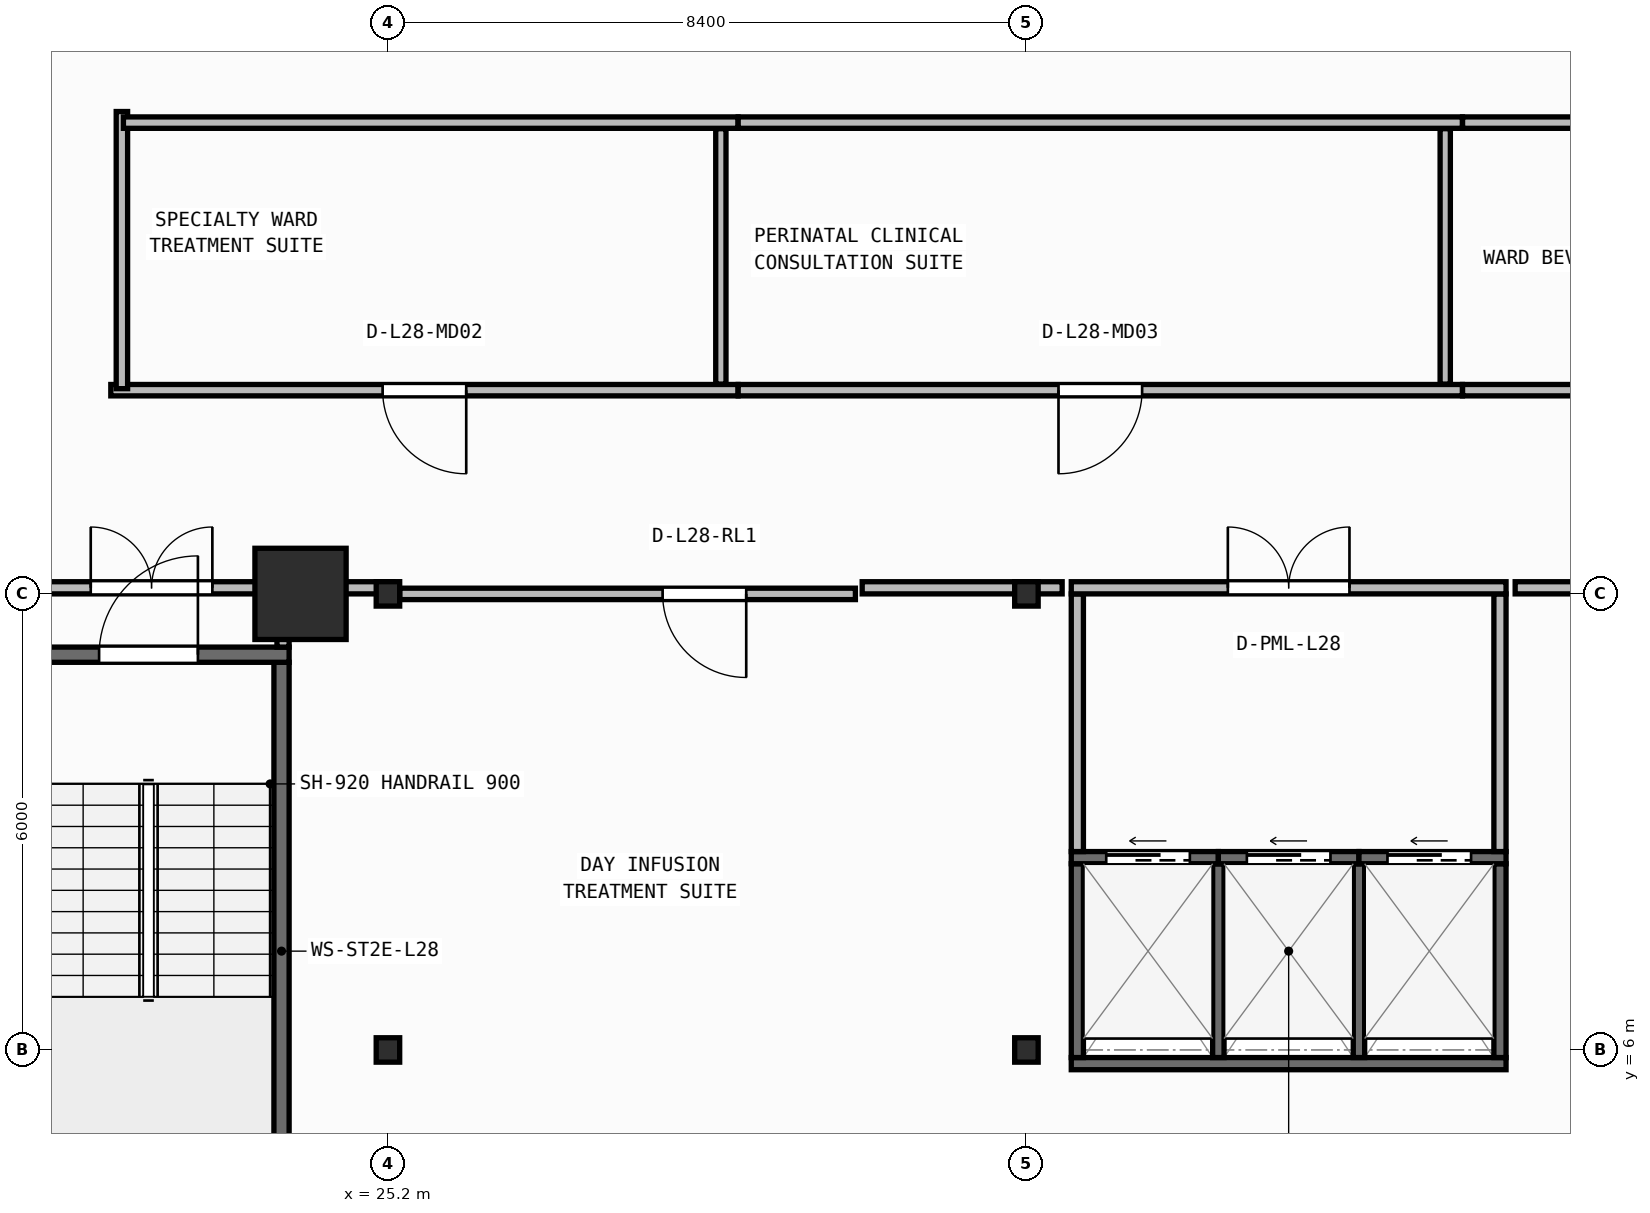
"""IFC4 building model, lengths in metres.
Left out: names, types, materials, properties, quantities, classifications, styles, units other than length and angle.
Written with IfcOpenShell. Run it as: python <this file> out.ifc"""

import sys

from ifc_helpers import new_model, si_unit, direction, frame, frame_2d, origin, origin_2d, place, context, subcontext, project, spatial, rectangle, i_section, extrude, element, fill, save


model = new_model("IFC4")
c1 = context("Model", 3, precision=1e-05, world=origin(), true_north=direction((0.0, 1.0)))
c2 = subcontext(c1, "Body", "Model", "MODEL_VIEW")
j1 = project(units=[si_unit("LENGTHUNIT", "METRE"), si_unit("PLANEANGLEUNIT", "RADIAN")], contexts=[c1])
p1 = place(None, origin())
s1 = spatial("IfcSite", under=j1, at=p1, CompositionType="ELEMENT")
p2 = place(p1, origin())
s2 = spatial("IfcBuilding", under=s1, at=p2, CompositionType="ELEMENT")
p3 = place(p2, frame((0.0, 0.0, 115.2)))
s3 = spatial("IfcBuildingStorey", under=s2, at=p3, CompositionType="ELEMENT", Elevation=115.2)
for number, where, z_axis, x_axis in (
    (1, (25.2, 6.0, 0.0), (0.0, 0.0, 1.0), (1.0, 0.0, 0.0)),
    (2, (33.6, 6.0, 0.0), (0.0, 0.0, 1.0), (1.0, 0.0, 0.0)),
):
    element("IfcColumn", number, at=place(p3, frame(where, z_axis=z_axis, x_axis=x_axis)), inside=s3, PredefinedType="COLUMN", context=c2, shape_type="SweptSolid", body=[
        extrude(i_section(OverallWidth=0.309, OverallDepth=0.321, WebThickness=0.014, FlangeThickness=0.022, FilletRadius=0.017, at=origin_2d()), origin(), (0.0, 0.0, 1.0), 3.95),
    ])
p4 = place(p3, frame((24.05, 12.0, 0.0), z_axis=(0.0, 0.0, 1.0), x_axis=(1.0, 0.0, 0.0)))
e3 = element("IfcColumn", 3, at=p4, inside=s3, PredefinedType="COLUMN", context=c2, shape_type="SweptSolid", body=[
    extrude(rectangle(XDim=1.2, YDim=1.2, at=origin_2d()), origin(), (0.0, 0.0, 1.0), 3.95),
])
for number, where, z_axis, x_axis in (
    (4, (25.2, 12.0, 0.0), (0.0, 0.0, 1.0), (1.0, 0.0, 0.0)),
    (5, (33.6, 12.0, 0.0), (0.0, 0.0, 1.0), (1.0, 0.0, 0.0)),
):
    element("IfcColumn", number, at=place(p3, frame(where, z_axis=z_axis, x_axis=x_axis)), inside=s3, PredefinedType="COLUMN", context=c2, shape_type="SweptSolid", body=[
        extrude(i_section(OverallWidth=0.309, OverallDepth=0.321, WebThickness=0.014, FlangeThickness=0.022, FilletRadius=0.017, at=origin_2d()), origin(), (0.0, 0.0, 1.0), 3.95),
    ])
p5 = place(p3, frame((23.8, 3.5, 0.0), z_axis=(0.0, 0.0, 1.0), x_axis=(0.0, 1.0, 0.0)))
e6 = element("IfcWall", 6, at=p5, inside=s3, PredefinedType="SHEAR", context=c2, shape_type="SweptSolid", body=[
    extrude(rectangle(XDim=7.6, YDim=0.2, at=frame_2d((3.8, 0.0))), origin(), (0.0, 0.0, 1.0), 3.71),
])
p6 = place(p3, frame((20.2, 11.2, 0.0), z_axis=(0.0, 0.0, 1.0), x_axis=(1.0, 0.0, 0.0)))
e7 = element("IfcWall", 7, at=p6, inside=s3, PredefinedType="SHEAR", context=c2, shape_type="SweptSolid", body=[
    extrude(rectangle(XDim=3.7, YDim=0.2, at=frame_2d((1.85, 0.0))), origin(), (0.0, 0.0, 1.0), 3.71),
])
p7 = place(p6, frame((1.2, 0.0, 0.0)))
e8 = element("IfcOpeningElement", 8, at=p7, cuts=e7, PredefinedType="OPENING", context=c2, shape_type="SweptSolid", body=[
    extrude(rectangle(XDim=1.3, YDim=2.15, at=frame_2d((0.65, 1.075))), frame((0.0, 0.11, 0.0), z_axis=(0.0, -1.0, 0.0), x_axis=(1.0, 0.0, 0.0)), (0.0, 0.0, 1.0), 0.22),
])
p8 = place(p3, frame((34.19, 5.82, 0.0), z_axis=(0.0, 0.0, 1.0), x_axis=(1.0, 0.0, 0.0)))
e9 = element("IfcWall", 9, at=p8, inside=s3, PredefinedType="SHEAR", context=c2, shape_type="SweptSolid", body=[
    extrude(rectangle(XDim=5.72, YDim=0.16, at=frame_2d((2.86, 0.0))), origin(), (0.0, 0.0, 1.0), 3.71),
])
for number, where, z_axis, x_axis in (
    (10, (34.27, 5.9, 0.0), (0.0, 0.0, 1.0), (0.0, 1.0, 0.0)),
    (11, (39.83, 5.9, 0.0), (0.0, 0.0, 1.0), (0.0, 1.0, 0.0)),
):
    element("IfcWall", number, at=place(p3, frame(where, z_axis=z_axis, x_axis=x_axis)), inside=s3, PredefinedType="SHEAR", context=c2, shape_type="SweptSolid", body=[
        extrude(rectangle(XDim=2.55, YDim=0.16, at=frame_2d((1.275, 0.0))), origin(), (0.0, 0.0, 1.0), 3.71),
    ])
for number, where, z_axis, x_axis in (
    (12, (36.125, 5.9, 0.0), (0.0, 0.0, 1.0), (0.0, 1.0, 0.0)),
    (13, (37.975, 5.9, 0.0), (0.0, 0.0, 1.0), (0.0, 1.0, 0.0)),
):
    element("IfcWall", number, at=place(p3, frame(where, z_axis=z_axis, x_axis=x_axis)), inside=s3, PredefinedType="SHEAR", context=c2, shape_type="SweptSolid", body=[
        extrude(rectangle(XDim=2.55, YDim=0.15, at=frame_2d((1.275, 0.0))), origin(), (0.0, 0.0, 1.0), 3.71),
    ])
p9 = place(p3, frame((34.19, 8.53, 0.0), z_axis=(0.0, 0.0, 1.0), x_axis=(1.0, 0.0, 0.0)))
e14 = element("IfcWall", 14, at=p9, inside=s3, PredefinedType="SHEAR", context=c2, shape_type="SweptSolid", body=[
    extrude(rectangle(XDim=1.935, YDim=0.16, at=frame_2d((0.968, 0.0))), origin(), (0.0, 0.0, 1.0), 3.71),
])
p10 = place(p9, frame((0.46, 0.0, 0.0)))
e15 = element("IfcOpeningElement", 15, at=p10, cuts=e14, PredefinedType="OPENING", context=c2, shape_type="SweptSolid", body=[
    extrude(rectangle(XDim=1.1, YDim=2.15, at=frame_2d((0.55, 1.075))), frame((0.0, 0.09, 0.0), z_axis=(0.0, -1.0, 0.0), x_axis=(1.0, 0.0, 0.0)), (0.0, 0.0, 1.0), 0.18),
])
p11 = place(p3, frame((36.125, 8.53, 0.0), z_axis=(0.0, 0.0, 1.0), x_axis=(1.0, 0.0, 0.0)))
e16 = element("IfcWall", 16, at=p11, inside=s3, PredefinedType="SHEAR", context=c2, shape_type="SweptSolid", body=[
    extrude(rectangle(XDim=1.85, YDim=0.16, at=frame_2d((0.925, 0.0))), origin(), (0.0, 0.0, 1.0), 3.71),
])
p12 = place(p11, frame((0.375, 0.0, 0.0)))
e17 = element("IfcOpeningElement", 17, at=p12, cuts=e16, PredefinedType="OPENING", context=c2, shape_type="SweptSolid", body=[
    extrude(rectangle(XDim=1.1, YDim=2.15, at=frame_2d((0.55, 1.075))), frame((0.0, 0.09, 0.0), z_axis=(0.0, -1.0, 0.0), x_axis=(1.0, 0.0, 0.0)), (0.0, 0.0, 1.0), 0.18),
])
p13 = place(p3, frame((37.975, 8.53, 0.0), z_axis=(0.0, 0.0, 1.0), x_axis=(1.0, 0.0, 0.0)))
e18 = element("IfcWall", 18, at=p13, inside=s3, PredefinedType="SHEAR", context=c2, shape_type="SweptSolid", body=[
    extrude(rectangle(XDim=1.935, YDim=0.16, at=frame_2d((0.967, 0.0))), origin(), (0.0, 0.0, 1.0), 3.71),
])
p14 = place(p13, frame((0.375, 0.0, 0.0)))
e19 = element("IfcOpeningElement", 19, at=p14, cuts=e18, PredefinedType="OPENING", context=c2, shape_type="SweptSolid", body=[
    extrude(rectangle(XDim=1.1, YDim=2.15, at=frame_2d((0.55, 1.075))), frame((0.0, 0.09, 0.0), z_axis=(0.0, -1.0, 0.0), x_axis=(1.0, 0.0, 0.0)), (0.0, 0.0, 1.0), 0.18),
])
p15 = place(p3, frame((20.28, 12.08, 0.0), z_axis=(0.0, 0.0, 1.0), x_axis=(1.0, 0.0, 0.0)))
e20 = element("IfcWall", 20, at=p15, inside=s3, PredefinedType="PARTITIONING", context=c2, shape_type="SweptSolid", body=[
    extrude(rectangle(XDim=3.62, YDim=0.16, at=frame_2d((1.81, 0.0))), origin(), (0.0, 0.0, 1.0), 3.083),
])
p16 = place(p15, frame((1.01, 0.0, 0.0)))
e21 = element("IfcOpeningElement", 21, at=p16, cuts=e20, PredefinedType="OPENING", context=c2, shape_type="SweptSolid", body=[
    extrude(rectangle(XDim=1.6, YDim=2.05, at=frame_2d((0.8, 1.025))), frame((0.0, 0.09, 0.0), z_axis=(0.0, -1.0, 0.0), x_axis=(1.0, 0.0, 0.0)), (0.0, 0.0, 1.0), 0.18),
])
p17 = place(p3, frame((23.82, 11.3, 0.0), z_axis=(0.0, 0.0, 1.0), x_axis=(0.0, 1.0, 0.0)))
e22 = element("IfcWall", 22, at=p17, inside=s3, PredefinedType="PARTITIONING", context=c2, shape_type="SweptSolid", body=[
    extrude(rectangle(XDim=0.7, YDim=0.16, at=frame_2d((0.35, 0.0))), origin(), (0.0, 0.0, 1.0), 3.71),
])
for number, where, z_axis, x_axis in (
    (23, (34.27, 8.61, 0.0), (0.0, 0.0, 1.0), (0.0, 1.0, 0.0)),
    (24, (39.83, 8.61, 0.0), (0.0, 0.0, 1.0), (0.0, 1.0, 0.0)),
):
    element("IfcWall", number, at=place(p3, frame(where, z_axis=z_axis, x_axis=x_axis)), inside=s3, PredefinedType="PARTITIONING", context=c2, shape_type="SweptSolid", body=[
        extrude(rectangle(XDim=3.39, YDim=0.16, at=frame_2d((1.695, 0.0))), origin(), (0.0, 0.0, 1.0), 3.71),
    ])
p18 = place(p3, frame((34.19, 12.08, 0.0), z_axis=(0.0, 0.0, 1.0), x_axis=(1.0, 0.0, 0.0)))
e25 = element("IfcWall", 25, at=p18, inside=s3, PredefinedType="PARTITIONING", context=c2, shape_type="SweptSolid", body=[
    extrude(rectangle(XDim=5.72, YDim=0.16, at=frame_2d((2.86, 0.0))), origin(), (0.0, 0.0, 1.0), 3.083),
])
p19 = place(p18, frame((2.06, 0.0, 0.0)))
e26 = element("IfcOpeningElement", 26, at=p19, cuts=e25, PredefinedType="OPENING", context=c2, shape_type="SweptSolid", body=[
    extrude(rectangle(XDim=1.6, YDim=2.05, at=frame_2d((0.8, 1.025))), frame((0.0, 0.09, 0.0), z_axis=(0.0, -1.0, 0.0), x_axis=(1.0, 0.0, 0.0)), (0.0, 0.0, 1.0), 0.18),
])
p20 = place(p3, frame((31.35, 12.0, 0.0), z_axis=(0.0, 0.0, 1.0), x_axis=(-1.0, 0.0, 0.0)))
e27 = element("IfcWall", 27, at=p20, inside=s3, PredefinedType="PARTITIONING", context=c2, shape_type="SweptSolid", body=[
    extrude(rectangle(XDim=5.996, YDim=0.15, at=frame_2d((2.998, 0.0))), origin(), (0.0, 0.0, 1.0), 3.083),
])
p21 = place(p20, frame((1.436, 0.0, 0.0)))
e28 = element("IfcOpeningElement", 28, at=p21, cuts=e27, PredefinedType="OPENING", context=c2, shape_type="SweptSolid", body=[
    extrude(rectangle(XDim=1.1, YDim=2.1, at=frame_2d((0.55, 1.05))), frame((0.0, 0.085, 0.0), z_axis=(0.0, -1.0, 0.0), x_axis=(1.0, 0.0, 0.0)), (0.0, 0.0, 1.0), 0.17),
])
p22 = place(p3, frame((29.806, 14.68, 0.0), z_axis=(0.0, 0.0, 1.0), x_axis=(-1.0, 0.0, 0.0)))
e29 = element("IfcWall", 29, at=p22, inside=s3, PredefinedType="PARTITIONING", context=c2, shape_type="SweptSolid", body=[
    extrude(rectangle(XDim=8.252, YDim=0.15, at=frame_2d((4.126, 0.0))), origin(), (0.0, 0.0, 1.0), 3.71),
])
p23 = place(p22, frame((3.576, 0.0, 0.0)))
e30 = element("IfcOpeningElement", 30, at=p23, cuts=e29, PredefinedType="OPENING", context=c2, shape_type="SweptSolid", body=[
    extrude(rectangle(XDim=1.1, YDim=2.1, at=frame_2d((0.55, 1.05))), frame((0.0, 0.085, 0.0), z_axis=(0.0, -1.0, 0.0), x_axis=(1.0, 0.0, 0.0)), (0.0, 0.0, 1.0), 0.17),
])
p24 = place(p3, frame((39.336, 14.68, 0.0), z_axis=(0.0, 0.0, 1.0), x_axis=(-1.0, 0.0, 0.0)))
e31 = element("IfcWall", 31, at=p24, inside=s3, PredefinedType="PARTITIONING", context=c2, shape_type="SweptSolid", body=[
    extrude(rectangle(XDim=9.528, YDim=0.15, at=frame_2d((4.764, 0.0))), origin(), (0.0, 0.0, 1.0), 3.71),
])
p25 = place(p24, frame((4.214, 0.0, 0.0)))
e32 = element("IfcOpeningElement", 32, at=p25, cuts=e31, PredefinedType="OPENING", context=c2, shape_type="SweptSolid", body=[
    extrude(rectangle(XDim=1.1, YDim=2.1, at=frame_2d((0.55, 1.05))), frame((0.0, 0.085, 0.0), z_axis=(0.0, -1.0, 0.0), x_axis=(1.0, 0.0, 0.0)), (0.0, 0.0, 1.0), 0.17),
])
p26 = place(p3, frame((51.586, 14.68, 0.0), z_axis=(0.0, 0.0, 1.0), x_axis=(-1.0, 0.0, 0.0)))
e33 = element("IfcWall", 33, at=p26, inside=s3, PredefinedType="PARTITIONING", context=c2, shape_type="SweptSolid", body=[
    extrude(rectangle(XDim=12.248, YDim=0.15, at=frame_2d((6.124, 0.0))), origin(), (0.0, 0.0, 1.0), 3.71),
])
p27 = place(p26, frame((5.574, 0.0, 0.0)))
e34 = element("IfcOpeningElement", 34, at=p27, cuts=e33, PredefinedType="OPENING", context=c2, shape_type="SweptSolid", body=[
    extrude(rectangle(XDim=1.1, YDim=2.1, at=frame_2d((0.55, 1.05))), frame((0.0, 0.085, 0.0), z_axis=(0.0, -1.0, 0.0), x_axis=(1.0, 0.0, 0.0)), (0.0, 0.0, 1.0), 0.17),
])
p28 = place(p3, frame((21.7, 14.7, 0.0), z_axis=(0.0, 0.0, 1.0), x_axis=(0.0, 1.0, 0.0)))
e35 = element("IfcWall", 35, at=p28, inside=s3, PredefinedType="PARTITIONING", context=c2, shape_type="SweptSolid", body=[
    extrude(rectangle(XDim=3.646, YDim=0.15, at=frame_2d((1.823, 0.0))), origin(), (0.0, 0.0, 1.0), 3.71),
])
p29 = place(p3, frame((21.72, 18.2, 0.0), z_axis=(0.0, 0.0, 1.0), x_axis=(1.0, 0.0, 0.0)))
e36 = element("IfcWall", 36, at=p29, inside=s3, PredefinedType="PARTITIONING", context=c2, shape_type="SweptSolid", body=[
    extrude(rectangle(XDim=8.086, YDim=0.15, at=frame_2d((4.043, 0.0))), origin(), (0.0, 0.0, 1.0), 3.71),
])
p30 = place(p3, frame((29.808, 18.2, 0.0), z_axis=(0.0, 0.0, 1.0), x_axis=(1.0, 0.0, 0.0)))
e37 = element("IfcWall", 37, at=p30, inside=s3, PredefinedType="PARTITIONING", context=c2, shape_type="SweptSolid", body=[
    extrude(rectangle(XDim=9.528, YDim=0.15, at=frame_2d((4.764, 0.0))), origin(), (0.0, 0.0, 1.0), 3.71),
])
p31 = place(p3, frame((39.338, 18.2, 0.0), z_axis=(0.0, 0.0, 1.0), x_axis=(1.0, 0.0, 0.0)))
e38 = element("IfcWall", 38, at=p31, inside=s3, PredefinedType="PARTITIONING", context=c2, shape_type="SweptSolid", body=[
    extrude(rectangle(XDim=12.248, YDim=0.15, at=frame_2d((6.124, 0.0))), origin(), (0.0, 0.0, 1.0), 3.71),
])
for number, where, z_axis, x_axis in (
    (39, (29.58, 14.76, 0.0), (0.0, 0.0, 1.0), (0.0, 1.0, 0.0)),
    (40, (39.11, 14.76, 0.0), (0.0, 0.0, 1.0), (0.0, 1.0, 0.0)),
):
    element("IfcWall", number, at=place(p3, frame(where, z_axis=z_axis, x_axis=x_axis)), inside=s3, PredefinedType="PARTITIONING", context=c2, shape_type="SweptSolid", body=[
        extrude(rectangle(XDim=3.36, YDim=0.135, at=frame_2d((1.68, 0.0))), origin(), (0.0, 0.0, 1.0), 3.71),
    ])
p32 = place(p3, frame((24.02, 12.08, 0.0), z_axis=(0.0, 0.0, 1.0), x_axis=(1.0, 0.0, 0.0)))
e41 = element("IfcWall", 41, at=p32, inside=s3, PredefinedType="PARTITIONING", context=c2, shape_type="SweptSolid", body=[
    extrude(rectangle(XDim=1.245, YDim=0.16, at=frame_2d((0.623, 0.0))), origin(), (0.0, 0.0, 1.0), 3.083),
])
p33 = place(p3, frame((31.439, 12.08, 0.0), z_axis=(0.0, 0.0, 1.0), x_axis=(1.0, 0.0, 0.0)))
e42 = element("IfcWall", 42, at=p33, inside=s3, PredefinedType="PARTITIONING", context=c2, shape_type="SweptSolid", body=[
    extrude(rectangle(XDim=2.631, YDim=0.16, at=frame_2d((1.315, 0.0))), origin(), (0.0, 0.0, 1.0), 3.083),
])
p34 = place(p3, frame((40.03, 12.08, 0.0), z_axis=(0.0, 0.0, 1.0), x_axis=(1.0, 0.0, 0.0)))
e43 = element("IfcWall", 43, at=p34, inside=s3, PredefinedType="PARTITIONING", context=c2, shape_type="SweptSolid", body=[
    extrude(rectangle(XDim=2.781, YDim=0.16, at=frame_2d((1.39, 0.0))), origin(), (0.0, 0.0, 1.0), 3.083),
])
p35 = place(p7, origin())
e44 = element("IfcDoor", 44, at=p35, inside=s3, OperationType="SINGLE_SWING_RIGHT", PredefinedType="DOOR", context=c2, shape_type="SweptSolid", body=[
    extrude(rectangle(XDim=1.3, YDim=2.15, at=frame_2d((0.65, 1.075))), frame((0.0, 0.025, 0.0), z_axis=(0.0, -1.0, 0.0), x_axis=(1.0, 0.0, 0.0)), (0.0, 0.0, 1.0), 0.05),
])
fill(e8, e44)
p36 = place(p10, origin())
e45 = element("IfcDoor", 45, at=p36, inside=s3, OperationType="SLIDING_TO_LEFT", PredefinedType="DOOR", context=c2, shape_type="SweptSolid", body=[
    extrude(rectangle(XDim=1.1, YDim=2.15, at=frame_2d((0.55, 1.075))), frame((0.0, 0.025, 0.0), z_axis=(0.0, -1.0, 0.0), x_axis=(1.0, 0.0, 0.0)), (0.0, 0.0, 1.0), 0.05),
])
fill(e15, e45)
p37 = place(p12, origin())
e46 = element("IfcDoor", 46, at=p37, inside=s3, OperationType="SLIDING_TO_LEFT", PredefinedType="DOOR", context=c2, shape_type="SweptSolid", body=[
    extrude(rectangle(XDim=1.1, YDim=2.15, at=frame_2d((0.55, 1.075))), frame((0.0, 0.025, 0.0), z_axis=(0.0, -1.0, 0.0), x_axis=(1.0, 0.0, 0.0)), (0.0, 0.0, 1.0), 0.05),
])
fill(e17, e46)
p38 = place(p14, origin())
e47 = element("IfcDoor", 47, at=p38, inside=s3, OperationType="SLIDING_TO_LEFT", PredefinedType="DOOR", context=c2, shape_type="SweptSolid", body=[
    extrude(rectangle(XDim=1.1, YDim=2.15, at=frame_2d((0.55, 1.075))), frame((0.0, 0.025, 0.0), z_axis=(0.0, -1.0, 0.0), x_axis=(1.0, 0.0, 0.0)), (0.0, 0.0, 1.0), 0.05),
])
fill(e19, e47)
p39 = place(p16, origin())
e48 = element("IfcDoor", 48, at=p39, inside=s3, OperationType="DOUBLE_DOOR_SINGLE_SWING", PredefinedType="DOOR", context=c2, shape_type="SweptSolid", body=[
    extrude(rectangle(XDim=1.6, YDim=2.05, at=frame_2d((0.8, 1.025))), frame((0.0, 0.025, 0.0), z_axis=(0.0, -1.0, 0.0), x_axis=(1.0, 0.0, 0.0)), (0.0, 0.0, 1.0), 0.05),
])
fill(e21, e48)
p40 = place(p19, origin())
e49 = element("IfcDoor", 49, at=p40, inside=s3, OperationType="DOUBLE_DOOR_SINGLE_SWING", PredefinedType="DOOR", context=c2, shape_type="SweptSolid", body=[
    extrude(rectangle(XDim=1.6, YDim=2.05, at=frame_2d((0.8, 1.025))), frame((0.0, 0.025, 0.0), z_axis=(0.0, -1.0, 0.0), x_axis=(1.0, 0.0, 0.0)), (0.0, 0.0, 1.0), 0.05),
])
fill(e26, e49)
p41 = place(p21, origin())
e50 = element("IfcDoor", 50, at=p41, inside=s3, OperationType="SINGLE_SWING_LEFT", PredefinedType="DOOR", context=c2, shape_type="SweptSolid", body=[
    extrude(rectangle(XDim=1.1, YDim=2.1, at=frame_2d((0.55, 1.05))), frame((0.0, 0.025, 0.0), z_axis=(0.0, -1.0, 0.0), x_axis=(1.0, 0.0, 0.0)), (0.0, 0.0, 1.0), 0.05),
])
fill(e28, e50)
p42 = place(p23, origin())
e51 = element("IfcDoor", 51, at=p42, inside=s3, OperationType="SINGLE_SWING_LEFT", PredefinedType="DOOR", context=c2, shape_type="SweptSolid", body=[
    extrude(rectangle(XDim=1.1, YDim=2.1, at=frame_2d((0.55, 1.05))), frame((0.0, 0.025, 0.0), z_axis=(0.0, -1.0, 0.0), x_axis=(1.0, 0.0, 0.0)), (0.0, 0.0, 1.0), 0.05),
])
fill(e30, e51)
p43 = place(p25, origin())
e52 = element("IfcDoor", 52, at=p43, inside=s3, OperationType="SINGLE_SWING_RIGHT", PredefinedType="DOOR", context=c2, shape_type="SweptSolid", body=[
    extrude(rectangle(XDim=1.1, YDim=2.1, at=frame_2d((0.55, 1.05))), frame((0.0, 0.025, 0.0), z_axis=(0.0, -1.0, 0.0), x_axis=(1.0, 0.0, 0.0)), (0.0, 0.0, 1.0), 0.05),
])
fill(e32, e52)
save(model, sys.argv[1])
